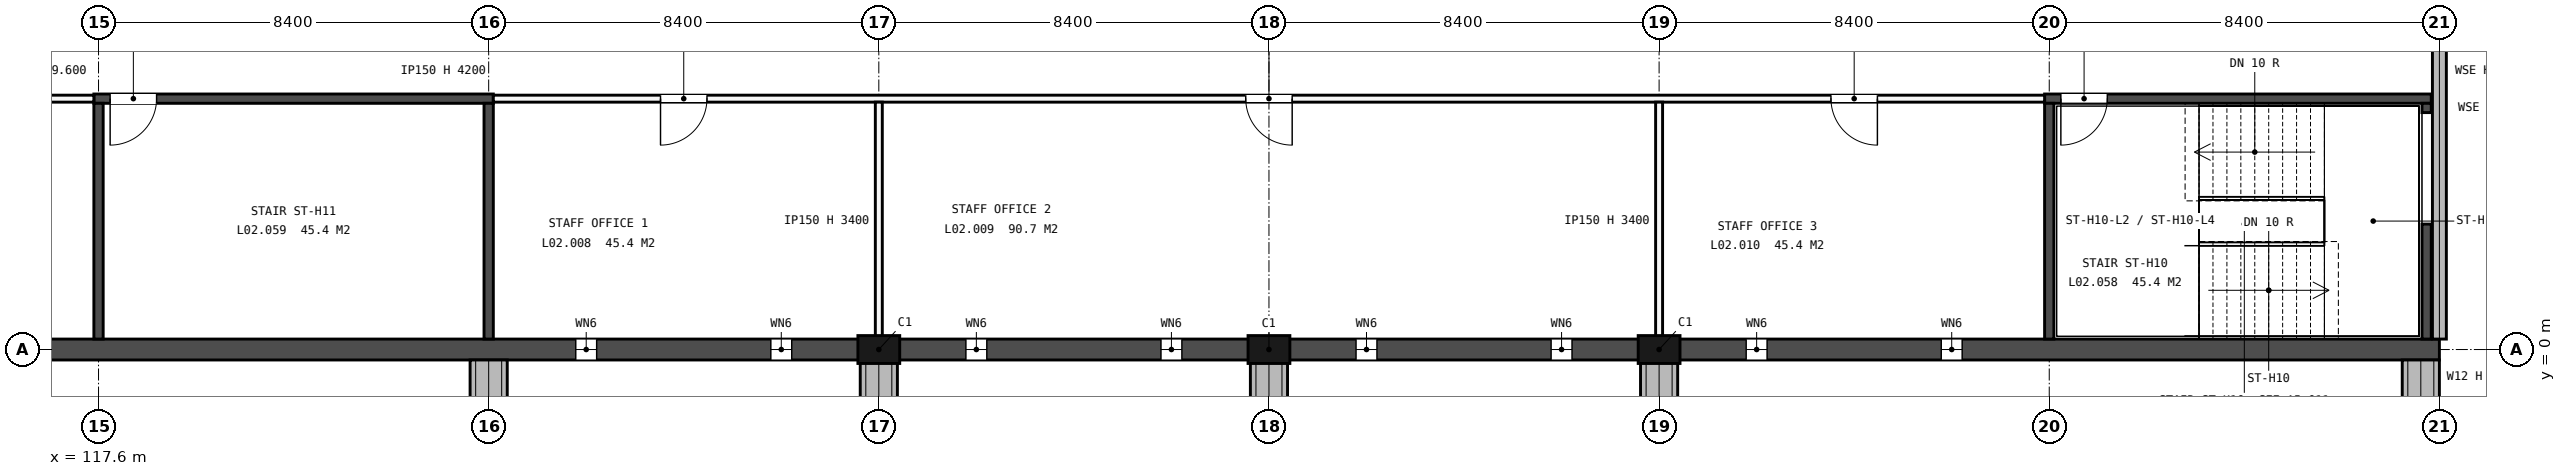
"""IFC4 building model, lengths in metres.
Left out: names, types, materials, properties, quantities, classifications, styles, units other than length and angle.
Written with IfcOpenShell. Run it as: python <this file> out.ifc"""

import sys

from ifc_helpers import new_model, si_unit, direction, frame, frame_2d, origin, origin_2d, place, context, subcontext, project, spatial, rectangle, extrude, element, fill, save


model = new_model("IFC4")
c1 = context("Model", 3, precision=1e-05, world=origin(), true_north=direction((0.0, 1.0)))
c2 = subcontext(c1, "Body", "Model", "MODEL_VIEW")
j1 = project(units=[si_unit("LENGTHUNIT", "METRE"), si_unit("PLANEANGLEUNIT", "RADIAN")], contexts=[c1])
p1 = place(None, origin())
s1 = spatial("IfcSite", under=j1, at=p1, CompositionType="ELEMENT")
p2 = place(p1, origin())
s2 = spatial("IfcBuilding", under=s1, at=p2, CompositionType="ELEMENT")
p3 = place(p2, frame((0.0, 0.0, 9.9)))
s3 = spatial("IfcBuildingStorey", under=s2, at=p3, CompositionType="ELEMENT", Elevation=9.9)
for number, where, z_axis, x_axis in (
    (1, (134.4, 0.0, -0.25), (0.0, 0.0, 1.0), (1.0, 0.0, 0.0)),
    (2, (142.8, 0.0, -0.25), (0.0, 0.0, 1.0), (1.0, 0.0, 0.0)),
    (3, (151.2, 0.0, -0.25), (0.0, 0.0, 1.0), (1.0, 0.0, 0.0)),
):
    element("IfcColumn", number, at=place(p3, frame(where, z_axis=z_axis, x_axis=x_axis)), inside=s3, PredefinedType="PILASTER", context=c2, shape_type="SweptSolid", body=[
        extrude(rectangle(XDim=0.9, YDim=0.6, at=origin_2d()), origin(), (0.0, 0.0, 1.0), 4.45),
    ])
p4 = place(p3, frame((0.0, 0.0, -0.25), z_axis=(0.0, 0.0, 1.0), x_axis=(1.0, 0.0, 0.0)))
e4 = element("IfcWall", 4, at=p4, inside=s3, PredefinedType="SOLIDWALL", context=c2, shape_type="SweptSolid", body=[
    extrude(rectangle(XDim=168.0, YDim=0.45, at=frame_2d((84.0, 0.0))), origin(), (0.0, 0.0, 1.0), 4.45),
])
p5 = place(p4, frame((27.075, 0.0, 1.45)))
e5 = element("IfcOpeningElement", 5, at=p5, cuts=e4, PredefinedType="OPENING", context=c2, shape_type="SweptSolid", body=[
    extrude(rectangle(XDim=0.45, YDim=2.4, at=frame_2d((0.225, 1.2))), frame((0.0, 0.235, 0.0), z_axis=(0.0, -1.0, 0.0), x_axis=(1.0, 0.0, 0.0)), (0.0, 0.0, 1.0), 0.47),
])
p6 = place(p4, frame((31.275, 0.0, 1.45)))
e6 = element("IfcOpeningElement", 6, at=p6, cuts=e4, PredefinedType="OPENING", context=c2, shape_type="SweptSolid", body=[
    extrude(rectangle(XDim=0.45, YDim=2.4, at=frame_2d((0.225, 1.2))), frame((0.0, 0.235, 0.0), z_axis=(0.0, -1.0, 0.0), x_axis=(1.0, 0.0, 0.0)), (0.0, 0.0, 1.0), 0.47),
])
p7 = place(p4, frame((35.475, 0.0, 1.45)))
e7 = element("IfcOpeningElement", 7, at=p7, cuts=e4, PredefinedType="OPENING", context=c2, shape_type="SweptSolid", body=[
    extrude(rectangle(XDim=0.45, YDim=2.4, at=frame_2d((0.225, 1.2))), frame((0.0, 0.235, 0.0), z_axis=(0.0, -1.0, 0.0), x_axis=(1.0, 0.0, 0.0)), (0.0, 0.0, 1.0), 0.47),
])
p8 = place(p4, frame((39.675, 0.0, 1.45)))
e8 = element("IfcOpeningElement", 8, at=p8, cuts=e4, PredefinedType="OPENING", context=c2, shape_type="SweptSolid", body=[
    extrude(rectangle(XDim=0.45, YDim=2.4, at=frame_2d((0.225, 1.2))), frame((0.0, 0.235, 0.0), z_axis=(0.0, -1.0, 0.0), x_axis=(1.0, 0.0, 0.0)), (0.0, 0.0, 1.0), 0.47),
])
p9 = place(p4, frame((94.275, 0.0, 1.45)))
e9 = element("IfcOpeningElement", 9, at=p9, cuts=e4, PredefinedType="OPENING", context=c2, shape_type="SweptSolid", body=[
    extrude(rectangle(XDim=0.45, YDim=2.4, at=frame_2d((0.225, 1.2))), frame((0.0, 0.235, 0.0), z_axis=(0.0, -1.0, 0.0), x_axis=(1.0, 0.0, 0.0)), (0.0, 0.0, 1.0), 0.47),
])
p10 = place(p4, frame((98.475, 0.0, 1.45)))
e10 = element("IfcOpeningElement", 10, at=p10, cuts=e4, PredefinedType="OPENING", context=c2, shape_type="SweptSolid", body=[
    extrude(rectangle(XDim=0.45, YDim=2.4, at=frame_2d((0.225, 1.2))), frame((0.0, 0.235, 0.0), z_axis=(0.0, -1.0, 0.0), x_axis=(1.0, 0.0, 0.0)), (0.0, 0.0, 1.0), 0.47),
])
p11 = place(p4, frame((102.675, 0.0, 1.45)))
e11 = element("IfcOpeningElement", 11, at=p11, cuts=e4, PredefinedType="OPENING", context=c2, shape_type="SweptSolid", body=[
    extrude(rectangle(XDim=0.45, YDim=2.4, at=frame_2d((0.225, 1.2))), frame((0.0, 0.235, 0.0), z_axis=(0.0, -1.0, 0.0), x_axis=(1.0, 0.0, 0.0)), (0.0, 0.0, 1.0), 0.47),
])
p12 = place(p4, frame((106.875, 0.0, 1.45)))
e12 = element("IfcOpeningElement", 12, at=p12, cuts=e4, PredefinedType="OPENING", context=c2, shape_type="SweptSolid", body=[
    extrude(rectangle(XDim=0.45, YDim=2.4, at=frame_2d((0.225, 1.2))), frame((0.0, 0.235, 0.0), z_axis=(0.0, -1.0, 0.0), x_axis=(1.0, 0.0, 0.0)), (0.0, 0.0, 1.0), 0.47),
])
p13 = place(p4, frame((111.075, 0.0, 1.45)))
e13 = element("IfcOpeningElement", 13, at=p13, cuts=e4, PredefinedType="OPENING", context=c2, shape_type="SweptSolid", body=[
    extrude(rectangle(XDim=0.45, YDim=2.4, at=frame_2d((0.225, 1.2))), frame((0.0, 0.235, 0.0), z_axis=(0.0, -1.0, 0.0), x_axis=(1.0, 0.0, 0.0)), (0.0, 0.0, 1.0), 0.47),
])
p14 = place(p4, frame((115.275, 0.0, 1.45)))
e14 = element("IfcOpeningElement", 14, at=p14, cuts=e4, PredefinedType="OPENING", context=c2, shape_type="SweptSolid", body=[
    extrude(rectangle(XDim=0.45, YDim=2.4, at=frame_2d((0.225, 1.2))), frame((0.0, 0.235, 0.0), z_axis=(0.0, -1.0, 0.0), x_axis=(1.0, 0.0, 0.0)), (0.0, 0.0, 1.0), 0.47),
])
p15 = place(p4, frame((127.875, 0.0, 1.45)))
e15 = element("IfcOpeningElement", 15, at=p15, cuts=e4, PredefinedType="OPENING", context=c2, shape_type="SweptSolid", body=[
    extrude(rectangle(XDim=0.45, YDim=2.4, at=frame_2d((0.225, 1.2))), frame((0.0, 0.235, 0.0), z_axis=(0.0, -1.0, 0.0), x_axis=(1.0, 0.0, 0.0)), (0.0, 0.0, 1.0), 0.47),
])
p16 = place(p4, frame((132.075, 0.0, 1.45)))
e16 = element("IfcOpeningElement", 16, at=p16, cuts=e4, PredefinedType="OPENING", context=c2, shape_type="SweptSolid", body=[
    extrude(rectangle(XDim=0.45, YDim=2.4, at=frame_2d((0.225, 1.2))), frame((0.0, 0.235, 0.0), z_axis=(0.0, -1.0, 0.0), x_axis=(1.0, 0.0, 0.0)), (0.0, 0.0, 1.0), 0.47),
])
p17 = place(p4, frame((136.275, 0.0, 1.45)))
e17 = element("IfcOpeningElement", 17, at=p17, cuts=e4, PredefinedType="OPENING", context=c2, shape_type="SweptSolid", body=[
    extrude(rectangle(XDim=0.45, YDim=2.4, at=frame_2d((0.225, 1.2))), frame((0.0, 0.235, 0.0), z_axis=(0.0, -1.0, 0.0), x_axis=(1.0, 0.0, 0.0)), (0.0, 0.0, 1.0), 0.47),
])
p18 = place(p4, frame((140.475, 0.0, 1.45)))
e18 = element("IfcOpeningElement", 18, at=p18, cuts=e4, PredefinedType="OPENING", context=c2, shape_type="SweptSolid", body=[
    extrude(rectangle(XDim=0.45, YDim=2.4, at=frame_2d((0.225, 1.2))), frame((0.0, 0.235, 0.0), z_axis=(0.0, -1.0, 0.0), x_axis=(1.0, 0.0, 0.0)), (0.0, 0.0, 1.0), 0.47),
])
p19 = place(p4, frame((144.675, 0.0, 1.45)))
e19 = element("IfcOpeningElement", 19, at=p19, cuts=e4, PredefinedType="OPENING", context=c2, shape_type="SweptSolid", body=[
    extrude(rectangle(XDim=0.45, YDim=2.4, at=frame_2d((0.225, 1.2))), frame((0.0, 0.235, 0.0), z_axis=(0.0, -1.0, 0.0), x_axis=(1.0, 0.0, 0.0)), (0.0, 0.0, 1.0), 0.47),
])
p20 = place(p4, frame((148.875, 0.0, 1.45)))
e20 = element("IfcOpeningElement", 20, at=p20, cuts=e4, PredefinedType="OPENING", context=c2, shape_type="SweptSolid", body=[
    extrude(rectangle(XDim=0.45, YDim=2.4, at=frame_2d((0.225, 1.2))), frame((0.0, 0.235, 0.0), z_axis=(0.0, -1.0, 0.0), x_axis=(1.0, 0.0, 0.0)), (0.0, 0.0, 1.0), 0.47),
])
p21 = place(p4, frame((153.075, 0.0, 1.45)))
e21 = element("IfcOpeningElement", 21, at=p21, cuts=e4, PredefinedType="OPENING", context=c2, shape_type="SweptSolid", body=[
    extrude(rectangle(XDim=0.45, YDim=2.4, at=frame_2d((0.225, 1.2))), frame((0.0, 0.235, 0.0), z_axis=(0.0, -1.0, 0.0), x_axis=(1.0, 0.0, 0.0)), (0.0, 0.0, 1.0), 0.47),
])
p22 = place(p4, frame((157.275, 0.0, 1.45)))
e22 = element("IfcOpeningElement", 22, at=p22, cuts=e4, PredefinedType="OPENING", context=c2, shape_type="SweptSolid", body=[
    extrude(rectangle(XDim=0.45, YDim=2.4, at=frame_2d((0.225, 1.2))), frame((0.0, 0.235, 0.0), z_axis=(0.0, -1.0, 0.0), x_axis=(1.0, 0.0, 0.0)), (0.0, 0.0, 1.0), 0.47),
])
p23 = place(p3, frame((168.0, 0.225, 0.0), z_axis=(0.0, 0.0, 1.0), x_axis=(0.0, 1.0, 0.0)))
e23 = element("IfcWall", 23, at=p23, inside=s3, PredefinedType="STANDARD", context=c2, shape_type="SweptSolid", body=[
    extrude(rectangle(XDim=7.875, YDim=0.3, at=frame_2d((3.938, 0.0))), origin(), (0.0, 0.0, 1.0), 3.55),
])
for number, where, z_axis, x_axis in (
    (24, (126.0, -0.225, -0.25), (0.0, 0.0, 1.0), (0.0, -1.0, 0.0)),
    (25, (134.4, -0.225, -0.25), (0.0, 0.0, 1.0), (0.0, -1.0, 0.0)),
    (26, (142.8, -0.225, -0.25), (0.0, 0.0, 1.0), (0.0, -1.0, 0.0)),
    (27, (151.2, -0.225, -0.25), (0.0, 0.0, 1.0), (0.0, -1.0, 0.0)),
    (28, (167.6, -0.225, -0.25), (0.0, 0.0, 1.0), (0.0, -1.0, 0.0)),
):
    element("IfcWall", number, at=place(p3, frame(where, z_axis=z_axis, x_axis=x_axis)), inside=s3, PredefinedType="SOLIDWALL", context=c2, shape_type="SweptSolid", body=[
        extrude(rectangle(XDim=0.9, YDim=0.8, at=frame_2d((0.45, 0.0))), origin(), (0.0, 0.0, 1.0), 4.45),
    ])
p24 = place(p3, frame((159.5, 5.4, -0.3), z_axis=(0.0, 0.0, 1.0), x_axis=(1.0, 0.0, 0.0)))
e29 = element("IfcWall", 29, at=p24, inside=s3, PredefinedType="SHEAR", context=c2, shape_type="SweptSolid", body=[
    extrude(rectangle(XDim=8.325, YDim=0.2, at=frame_2d((4.163, 0.0))), origin(), (0.0, 0.0, 1.0), 4.5),
])
p25 = place(p24, frame((0.35, 0.0, 0.3)))
e30 = element("IfcOpeningElement", 30, at=p25, cuts=e29, PredefinedType="OPENING", context=c2, shape_type="SweptSolid", body=[
    extrude(rectangle(XDim=1.0, YDim=2.1, at=frame_2d((0.5, 1.05))), frame((0.0, 0.11, 0.0), z_axis=(0.0, -1.0, 0.0), x_axis=(1.0, 0.0, 0.0)), (0.0, 0.0, 1.0), 0.22),
])
p26 = place(p3, frame((159.6, 0.225, -0.3), z_axis=(0.0, 0.0, 1.0), x_axis=(0.0, 1.0, 0.0)))
e31 = element("IfcWall", 31, at=p26, inside=s3, PredefinedType="SHEAR", context=c2, shape_type="SweptSolid", body=[
    extrude(rectangle(XDim=5.075, YDim=0.2, at=frame_2d((2.538, 0.0))), origin(), (0.0, 0.0, 1.0), 4.5),
])
p27 = place(p3, frame((167.725, 0.225, -0.3), z_axis=(0.0, 0.0, 1.0), x_axis=(0.0, 1.0, 0.0)))
e32 = element("IfcWall", 32, at=p27, inside=s3, PredefinedType="SHEAR", context=c2, shape_type="SweptSolid", body=[
    extrude(rectangle(XDim=2.475, YDim=0.2, at=frame_2d((1.237, 0.0))), origin(), (0.0, 0.0, 1.0), 4.5),
])
p28 = place(p3, frame((167.725, 5.1, -0.3), z_axis=(0.0, 0.0, 1.0), x_axis=(0.0, 1.0, 0.0)))
e33 = element("IfcWall", 33, at=p28, inside=s3, PredefinedType="SHEAR", context=c2, shape_type="SweptSolid", body=[
    extrude(rectangle(XDim=0.2, YDim=0.2, at=frame_2d((0.1, 0.0))), origin(), (0.0, 0.0, 1.0), 4.5),
])
p29 = place(p3, frame((117.5, 5.4, -0.3), z_axis=(0.0, 0.0, 1.0), x_axis=(1.0, 0.0, 0.0)))
e34 = element("IfcWall", 34, at=p29, inside=s3, PredefinedType="SHEAR", context=c2, shape_type="SweptSolid", body=[
    extrude(rectangle(XDim=8.6, YDim=0.2, at=frame_2d((4.3, 0.0))), origin(), (0.0, 0.0, 1.0), 4.5),
])
p30 = place(p29, frame((0.35, 0.0, 0.3)))
e35 = element("IfcOpeningElement", 35, at=p30, cuts=e34, PredefinedType="OPENING", context=c2, shape_type="SweptSolid", body=[
    extrude(rectangle(XDim=1.0, YDim=2.1, at=frame_2d((0.5, 1.05))), frame((0.0, 0.11, 0.0), z_axis=(0.0, -1.0, 0.0), x_axis=(1.0, 0.0, 0.0)), (0.0, 0.0, 1.0), 0.22),
])
for number, where, z_axis, x_axis in (
    (36, (117.6, 0.225, -0.3), (0.0, 0.0, 1.0), (0.0, 1.0, 0.0)),
    (37, (126.0, 0.225, -0.3), (0.0, 0.0, 1.0), (0.0, 1.0, 0.0)),
):
    element("IfcWall", number, at=place(p3, frame(where, z_axis=z_axis, x_axis=x_axis)), inside=s3, PredefinedType="SHEAR", context=c2, shape_type="SweptSolid", body=[
        extrude(rectangle(XDim=5.075, YDim=0.2, at=frame_2d((2.538, 0.0))), origin(), (0.0, 0.0, 1.0), 4.5),
    ])
p31 = place(p3, frame((84.0, 5.4, 0.0), z_axis=(0.0, 0.0, 1.0), x_axis=(1.0, 0.0, 0.0)))
e38 = element("IfcWall", 38, at=p31, inside=s3, PredefinedType="PARTITIONING", context=c2, shape_type="SweptSolid", body=[
    extrude(rectangle(XDim=33.5, YDim=0.15, at=frame_2d((16.75, 0.0))), origin(), (0.0, 0.0, 1.0), 4.2),
])
p32 = place(p31, frame((3.7, 0.0, 0.0)))
e39 = element("IfcOpeningElement", 39, at=p32, cuts=e38, PredefinedType="OPENING", context=c2, shape_type="SweptSolid", body=[
    extrude(rectangle(XDim=1.0, YDim=2.1, at=frame_2d((0.5, 1.05))), frame((0.0, 0.085, 0.0), z_axis=(0.0, -1.0, 0.0), x_axis=(1.0, 0.0, 0.0)), (0.0, 0.0, 1.0), 0.17),
])
p33 = place(p31, frame((20.4, 0.0, 0.0)))
e40 = element("IfcOpeningElement", 40, at=p33, cuts=e38, PredefinedType="OPENING", context=c2, shape_type="SweptSolid", body=[
    extrude(rectangle(XDim=1.2, YDim=2.1, at=frame_2d((0.6, 1.05))), frame((0.0, 0.085, 0.0), z_axis=(0.0, -1.0, 0.0), x_axis=(1.0, 0.0, 0.0)), (0.0, 0.0, 1.0), 0.17),
])
p34 = place(p3, frame((126.1, 5.4, 0.0), z_axis=(0.0, 0.0, 1.0), x_axis=(1.0, 0.0, 0.0)))
e41 = element("IfcWall", 41, at=p34, inside=s3, PredefinedType="PARTITIONING", context=c2, shape_type="SweptSolid", body=[
    extrude(rectangle(XDim=33.4, YDim=0.15, at=frame_2d((16.7, 0.0))), origin(), (0.0, 0.0, 1.0), 4.2),
])
p35 = place(p34, frame((3.6, 0.0, 0.0)))
e42 = element("IfcOpeningElement", 42, at=p35, cuts=e41, PredefinedType="OPENING", context=c2, shape_type="SweptSolid", body=[
    extrude(rectangle(XDim=1.0, YDim=2.1, at=frame_2d((0.5, 1.05))), frame((0.0, 0.085, 0.0), z_axis=(0.0, -1.0, 0.0), x_axis=(1.0, 0.0, 0.0)), (0.0, 0.0, 1.0), 0.17),
])
p36 = place(p34, frame((16.2, 0.0, 0.0)))
e43 = element("IfcOpeningElement", 43, at=p36, cuts=e41, PredefinedType="OPENING", context=c2, shape_type="SweptSolid", body=[
    extrude(rectangle(XDim=1.0, YDim=2.1, at=frame_2d((0.5, 1.05))), frame((0.0, 0.085, 0.0), z_axis=(0.0, -1.0, 0.0), x_axis=(1.0, 0.0, 0.0)), (0.0, 0.0, 1.0), 0.17),
])
p37 = place(p34, frame((28.8, 0.0, 0.0)))
e44 = element("IfcOpeningElement", 44, at=p37, cuts=e41, PredefinedType="OPENING", context=c2, shape_type="SweptSolid", body=[
    extrude(rectangle(XDim=1.0, YDim=2.1, at=frame_2d((0.5, 1.05))), frame((0.0, 0.085, 0.0), z_axis=(0.0, -1.0, 0.0), x_axis=(1.0, 0.0, 0.0)), (0.0, 0.0, 1.0), 0.17),
])
for number, where, z_axis, x_axis in (
    (45, (134.4, 0.225, 0.0), (0.0, 0.0, 1.0), (0.0, 1.0, 0.0)),
    (46, (151.2, 0.225, 0.0), (0.0, 0.0, 1.0), (0.0, 1.0, 0.0)),
):
    element("IfcWall", number, at=place(p3, frame(where, z_axis=z_axis, x_axis=x_axis)), inside=s3, PredefinedType="PARTITIONING", context=c2, shape_type="SweptSolid", body=[
        extrude(rectangle(XDim=5.1, YDim=0.15, at=frame_2d((2.55, 0.0))), origin(), (0.0, 0.0, 1.0), 3.4),
    ])
p38 = place(p15, origin())
e47 = element("IfcWindow", 47, at=p38, inside=s3, PartitioningType="SINGLE_PANEL", PredefinedType="WINDOW", context=c2, shape_type="SweptSolid", body=[
    extrude(rectangle(XDim=0.45, YDim=2.4, at=frame_2d((0.225, 1.2))), frame((0.0, 0.03, 0.0), z_axis=(0.0, -1.0, 0.0), x_axis=(1.0, 0.0, 0.0)), (0.0, 0.0, 1.0), 0.06),
])
fill(e15, e47)
p39 = place(p16, origin())
e48 = element("IfcWindow", 48, at=p39, inside=s3, PartitioningType="SINGLE_PANEL", PredefinedType="WINDOW", context=c2, shape_type="SweptSolid", body=[
    extrude(rectangle(XDim=0.45, YDim=2.4, at=frame_2d((0.225, 1.2))), frame((0.0, 0.03, 0.0), z_axis=(0.0, -1.0, 0.0), x_axis=(1.0, 0.0, 0.0)), (0.0, 0.0, 1.0), 0.06),
])
fill(e16, e48)
p40 = place(p17, origin())
e49 = element("IfcWindow", 49, at=p40, inside=s3, PartitioningType="SINGLE_PANEL", PredefinedType="WINDOW", context=c2, shape_type="SweptSolid", body=[
    extrude(rectangle(XDim=0.45, YDim=2.4, at=frame_2d((0.225, 1.2))), frame((0.0, 0.03, 0.0), z_axis=(0.0, -1.0, 0.0), x_axis=(1.0, 0.0, 0.0)), (0.0, 0.0, 1.0), 0.06),
])
fill(e17, e49)
p41 = place(p18, origin())
e50 = element("IfcWindow", 50, at=p41, inside=s3, PartitioningType="SINGLE_PANEL", PredefinedType="WINDOW", context=c2, shape_type="SweptSolid", body=[
    extrude(rectangle(XDim=0.45, YDim=2.4, at=frame_2d((0.225, 1.2))), frame((0.0, 0.03, 0.0), z_axis=(0.0, -1.0, 0.0), x_axis=(1.0, 0.0, 0.0)), (0.0, 0.0, 1.0), 0.06),
])
fill(e18, e50)
p42 = place(p19, origin())
e51 = element("IfcWindow", 51, at=p42, inside=s3, PartitioningType="SINGLE_PANEL", PredefinedType="WINDOW", context=c2, shape_type="SweptSolid", body=[
    extrude(rectangle(XDim=0.45, YDim=2.4, at=frame_2d((0.225, 1.2))), frame((0.0, 0.03, 0.0), z_axis=(0.0, -1.0, 0.0), x_axis=(1.0, 0.0, 0.0)), (0.0, 0.0, 1.0), 0.06),
])
fill(e19, e51)
p43 = place(p20, origin())
e52 = element("IfcWindow", 52, at=p43, inside=s3, PartitioningType="SINGLE_PANEL", PredefinedType="WINDOW", context=c2, shape_type="SweptSolid", body=[
    extrude(rectangle(XDim=0.45, YDim=2.4, at=frame_2d((0.225, 1.2))), frame((0.0, 0.03, 0.0), z_axis=(0.0, -1.0, 0.0), x_axis=(1.0, 0.0, 0.0)), (0.0, 0.0, 1.0), 0.06),
])
fill(e20, e52)
p44 = place(p21, origin())
e53 = element("IfcWindow", 53, at=p44, inside=s3, PartitioningType="SINGLE_PANEL", PredefinedType="WINDOW", context=c2, shape_type="SweptSolid", body=[
    extrude(rectangle(XDim=0.45, YDim=2.4, at=frame_2d((0.225, 1.2))), frame((0.0, 0.03, 0.0), z_axis=(0.0, -1.0, 0.0), x_axis=(1.0, 0.0, 0.0)), (0.0, 0.0, 1.0), 0.06),
])
fill(e21, e53)
p45 = place(p22, origin())
e54 = element("IfcWindow", 54, at=p45, inside=s3, PartitioningType="SINGLE_PANEL", PredefinedType="WINDOW", context=c2, shape_type="SweptSolid", body=[
    extrude(rectangle(XDim=0.45, YDim=2.4, at=frame_2d((0.225, 1.2))), frame((0.0, 0.03, 0.0), z_axis=(0.0, -1.0, 0.0), x_axis=(1.0, 0.0, 0.0)), (0.0, 0.0, 1.0), 0.06),
])
fill(e22, e54)
p46 = place(p25, origin())
e55 = element("IfcDoor", 55, at=p46, inside=s3, OperationType="SINGLE_SWING_LEFT", PredefinedType="DOOR", context=c2, shape_type="SweptSolid", body=[
    extrude(rectangle(XDim=1.0, YDim=2.1, at=frame_2d((0.5, 1.05))), frame((0.0, 0.025, 0.0), z_axis=(0.0, -1.0, 0.0), x_axis=(1.0, 0.0, 0.0)), (0.0, 0.0, 1.0), 0.05),
])
fill(e30, e55)
p47 = place(p30, origin())
e56 = element("IfcDoor", 56, at=p47, inside=s3, OperationType="SINGLE_SWING_LEFT", PredefinedType="DOOR", context=c2, shape_type="SweptSolid", body=[
    extrude(rectangle(XDim=1.0, YDim=2.1, at=frame_2d((0.5, 1.05))), frame((0.0, 0.025, 0.0), z_axis=(0.0, -1.0, 0.0), x_axis=(1.0, 0.0, 0.0)), (0.0, 0.0, 1.0), 0.05),
])
fill(e35, e56)
p48 = place(p35, origin())
e57 = element("IfcDoor", 57, at=p48, inside=s3, OperationType="SINGLE_SWING_LEFT", PredefinedType="DOOR", context=c2, shape_type="SweptSolid", body=[
    extrude(rectangle(XDim=1.0, YDim=2.1, at=frame_2d((0.5, 1.05))), frame((0.0, 0.025, 0.0), z_axis=(0.0, -1.0, 0.0), x_axis=(1.0, 0.0, 0.0)), (0.0, 0.0, 1.0), 0.05),
])
fill(e42, e57)
p49 = place(p36, origin())
e58 = element("IfcDoor", 58, at=p49, inside=s3, OperationType="SINGLE_SWING_RIGHT", PredefinedType="DOOR", context=c2, shape_type="SweptSolid", body=[
    extrude(rectangle(XDim=1.0, YDim=2.1, at=frame_2d((0.5, 1.05))), frame((0.0, 0.025, 0.0), z_axis=(0.0, -1.0, 0.0), x_axis=(1.0, 0.0, 0.0)), (0.0, 0.0, 1.0), 0.05),
])
fill(e43, e58)
p50 = place(p37, origin())
e59 = element("IfcDoor", 59, at=p50, inside=s3, OperationType="SINGLE_SWING_RIGHT", PredefinedType="DOOR", context=c2, shape_type="SweptSolid", body=[
    extrude(rectangle(XDim=1.0, YDim=2.1, at=frame_2d((0.5, 1.05))), frame((0.0, 0.025, 0.0), z_axis=(0.0, -1.0, 0.0), x_axis=(1.0, 0.0, 0.0)), (0.0, 0.0, 1.0), 0.05),
])
fill(e44, e59)
save(model, sys.argv[1])
